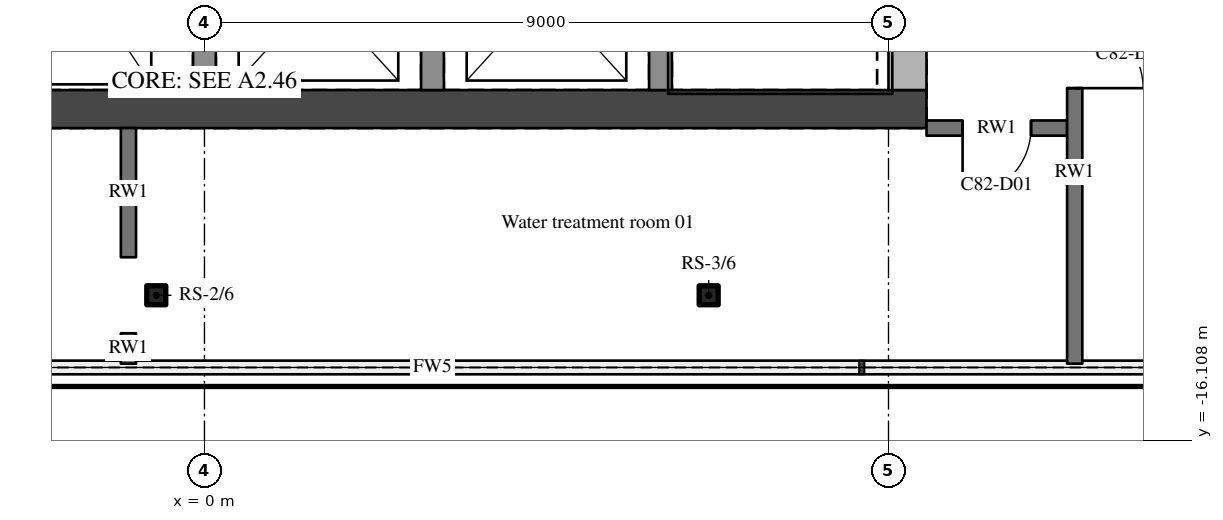
"""IFC4 building model, lengths in metres.
Left out: names, types, materials, properties, quantities, classifications, styles, units other than length and angle.
Written with IfcOpenShell. Run it as: python <this file> out.ifc"""

import sys

from ifc_helpers import new_model, si_unit, direction, frame, frame_2d, origin, origin_2d, place, context, subcontext, project, spatial, polyline, rectangle, hollow_rectangle, outline, extrude, element, fill, save


model = new_model("IFC4")
c1 = context("Model", 3, precision=1e-05, world=origin(), true_north=direction((0.0, 1.0)))
c2 = subcontext(c1, "Body", "Model", "MODEL_VIEW")
j1 = project(units=[si_unit("LENGTHUNIT", "METRE"), si_unit("PLANEANGLEUNIT", "RADIAN")], contexts=[c1])
p1 = place(None, origin())
s1 = spatial("IfcSite", under=j1, at=p1, CompositionType="ELEMENT")
p2 = place(p1, origin())
s2 = spatial("IfcBuilding", under=s1, at=p2, CompositionType="ELEMENT")
p3 = place(p2, frame((0.0, 0.0, 304.5)))
s3 = spatial("IfcBuildingStorey", under=s2, at=p3, CompositionType="ELEMENT", Elevation=304.5)
for number, where, z_axis, x_axis in (
    (1, (-0.634, -14.2, 0.0), (0.0, 0.0, 1.0), (1.0, 0.0, 0.0)),
    (2, (6.634, -14.2, 0.0), (0.0, 0.0, 1.0), (1.0, 0.0, 0.0)),
):
    element("IfcColumn", number, at=place(p3, frame(where, z_axis=z_axis, x_axis=x_axis)), inside=s3, PredefinedType="COLUMN", context=c2, shape_type="SweptSolid", body=[
        extrude(hollow_rectangle(XDim=0.25, YDim=0.25, WallThickness=0.02, InnerFilletRadius=0.03, OuterFilletRadius=0.05, at=origin_2d()), origin(), (0.0, 0.0, 1.0), 3.6),
    ])
p4 = place(p3, frame((-9.5, -11.75, 0.0), z_axis=(0.0, 0.0, 1.0), x_axis=(1.0, 0.0, 0.0)))
e3 = element("IfcWall", 3, at=p4, inside=s3, PredefinedType="SHEAR", context=c2, shape_type="SweptSolid", body=[
    extrude(outline(polyline([(0.0, 0.0), (19.0, 0.0), (19.0, 3.6), (0.0, 3.6), (0.0, 0.0)])), frame((0.0, 0.25, 0.0), z_axis=(0.0, -1.0, 0.0), x_axis=(1.0, 0.0, 0.0)), (0.0, 0.0, 1.0), 0.5),
])
p5 = place(p3, frame((9.25, -11.5, 0.0), z_axis=(0.0, 0.0, 1.0), x_axis=(0.0, 1.0, 0.0)))
e4 = element("IfcWall", 4, at=p5, inside=s3, PredefinedType="SHEAR", context=c2, shape_type="SweptSolid", body=[
    extrude(outline(polyline([(0.0, 0.0), (11.65, 0.0), (11.65, 3.6), (0.0, 3.6), (0.0, 0.0)])), frame((0.0, 0.25, 0.0), z_axis=(0.0, -1.0, 0.0), x_axis=(1.0, 0.0, 0.0)), (0.0, 0.0, 1.0), 0.5),
])
p6 = place(p5, frame((9.4, 0.0, 0.0)))
e5 = element("IfcOpeningElement", 5, at=p6, cuts=e4, PredefinedType="OPENING", context=c2, shape_type="SweptSolid", body=[
    extrude(rectangle(XDim=1.8, YDim=2.1, at=frame_2d((0.9, 1.05))), frame((0.0, 0.26, 0.0), z_axis=(0.0, -1.0, 0.0), x_axis=(1.0, 0.0, 0.0)), (0.0, 0.0, 1.0), 0.52),
])
p7 = place(p5, frame((5.25, 0.0, 0.0)))
e6 = element("IfcOpeningElement", 6, at=p7, cuts=e4, PredefinedType="OPENING", context=c2, shape_type="SweptSolid", body=[
    extrude(rectangle(XDim=1.1, YDim=2.1, at=frame_2d((0.55, 1.05))), frame((0.0, 0.26, 0.0), z_axis=(0.0, -1.0, 0.0), x_axis=(1.0, 0.0, 0.0)), (0.0, 0.0, 1.0), 0.52),
])
p8 = place(p3, frame((11.35, -12.0, 0.0), z_axis=(0.0, 0.0, 1.0), x_axis=(-1.0, 0.0, 0.0)))
e7 = element("IfcWall", 7, at=p8, inside=s3, PredefinedType="SOLIDWALL", context=c2, shape_type="SweptSolid", body=[
    extrude(rectangle(XDim=1.85, YDim=0.2, at=frame_2d((0.925, 0.0))), origin(), (0.0, 0.0, 1.0), 2.66),
])
p9 = place(p8, frame((0.475, 0.0, 0.0)))
e8 = element("IfcOpeningElement", 8, at=p9, cuts=e7, PredefinedType="OPENING", context=c2, shape_type="SweptSolid", body=[
    extrude(rectangle(XDim=0.9, YDim=2.1, at=frame_2d((0.45, 1.05))), frame((0.0, 0.11, 0.0), z_axis=(0.0, -1.0, 0.0), x_axis=(1.0, 0.0, 0.0)), (0.0, 0.0, 1.0), 0.22),
])
p10 = place(p3, frame((-1.0, -15.1, 0.0), z_axis=(0.0, 0.0, 1.0), x_axis=(0.0, 1.0, 0.0)))
e9 = element("IfcWall", 9, at=p10, inside=s3, PredefinedType="SOLIDWALL", context=c2, shape_type="SweptSolid", body=[
    extrude(rectangle(XDim=0.4, YDim=0.2, at=frame_2d((0.2, 0.0))), origin(), (0.0, 0.0, 1.0), 2.66),
])
p11 = place(p3, frame((-1.0, -13.7, 0.0), z_axis=(0.0, 0.0, 1.0), x_axis=(0.0, 1.0, 0.0)))
e10 = element("IfcWall", 10, at=p11, inside=s3, PredefinedType="SOLIDWALL", context=c2, shape_type="SweptSolid", body=[
    extrude(rectangle(XDim=1.7, YDim=0.2, at=frame_2d((0.85, 0.0))), origin(), (0.0, 0.0, 1.0), 2.66),
])
for number, where, z_axis, x_axis in (
    (11, (0.0, -11.5, 0.0), (0.0, 0.0, 1.0), (0.0, 1.0, 0.0)),
    (12, (3.0, -11.5, 0.0), (0.0, 0.0, 1.0), (0.0, 1.0, 0.0)),
):
    element("IfcWall", number, at=place(p3, frame(where, z_axis=z_axis, x_axis=x_axis)), inside=s3, PredefinedType="SHEAR", context=c2, shape_type="SweptSolid", body=[
        extrude(rectangle(XDim=2.4, YDim=0.3, at=frame_2d((1.2, 0.0))), origin(), (0.0, 0.0, 1.0), 3.6),
    ])
p12 = place(p3, frame((6.0, -5.1, 0.0), z_axis=(0.0, 0.0, 1.0), x_axis=(0.0, -1.0, 0.0)))
e13 = element("IfcWall", 13, at=p12, inside=s3, PredefinedType="SHEAR", context=c2, shape_type="SweptSolid", body=[
    extrude(rectangle(XDim=6.4, YDim=0.3, at=frame_2d((3.2, 0.0))), origin(), (0.0, 0.0, 1.0), 3.6),
])
p13 = place(p12, frame((0.15, 0.0, 0.0)))
e14 = element("IfcOpeningElement", 14, at=p13, cuts=e13, PredefinedType="OPENING", context=c2, shape_type="SweptSolid", body=[
    extrude(rectangle(XDim=1.1, YDim=2.1, at=frame_2d((0.55, 1.05))), frame((0.0, 0.16, 0.0), z_axis=(0.0, -1.0, 0.0), x_axis=(1.0, 0.0, 0.0)), (0.0, 0.0, 1.0), 0.32),
])
p14 = place(p3, frame((11.45, -10.05, 0.0), z_axis=(0.0, 0.0, 1.0), x_axis=(0.0, -1.0, 0.0)))
e15 = element("IfcWall", 15, at=p14, inside=s3, PredefinedType="SOLIDWALL", context=c2, shape_type="SweptSolid", body=[
    extrude(rectangle(XDim=5.05, YDim=0.2, at=frame_2d((2.525, 0.0))), origin(), (0.0, 0.0, 1.0), 2.66),
])
p15 = place(p14, frame((0.525, 0.0, 0.0)))
e16 = element("IfcOpeningElement", 16, at=p15, cuts=e15, PredefinedType="OPENING", context=c2, shape_type="SweptSolid", body=[
    extrude(rectangle(XDim=0.9, YDim=2.1, at=frame_2d((0.45, 1.05))), frame((0.0, 0.11, 0.0), z_axis=(0.0, -1.0, 0.0), x_axis=(1.0, 0.0, 0.0)), (0.0, 0.0, 1.0), 0.22),
])
p16 = place(p15, origin())
e17 = element("IfcDoor", 17, at=p16, inside=s3, OperationType="SINGLE_SWING_RIGHT", PredefinedType="DOOR", context=c2, shape_type="SweptSolid", body=[
    extrude(rectangle(XDim=0.9, YDim=2.1, at=frame_2d((0.45, 1.05))), frame((0.0, 0.025, 0.0), z_axis=(0.0, -1.0, 0.0), x_axis=(1.0, 0.0, 0.0)), (0.0, 0.0, 1.0), 0.05),
])
fill(e16, e17)
p17 = place(p9, origin())
e18 = element("IfcDoor", 18, at=p17, inside=s3, OperationType="SINGLE_SWING_RIGHT", PredefinedType="DOOR", context=c2, shape_type="SweptSolid", body=[
    extrude(rectangle(XDim=0.9, YDim=2.1, at=frame_2d((0.45, 1.05))), frame((0.0, 0.025, 0.0), z_axis=(0.0, -1.0, 0.0), x_axis=(1.0, 0.0, 0.0)), (0.0, 0.0, 1.0), 0.05),
])
fill(e8, e18)
save(model, sys.argv[1])
